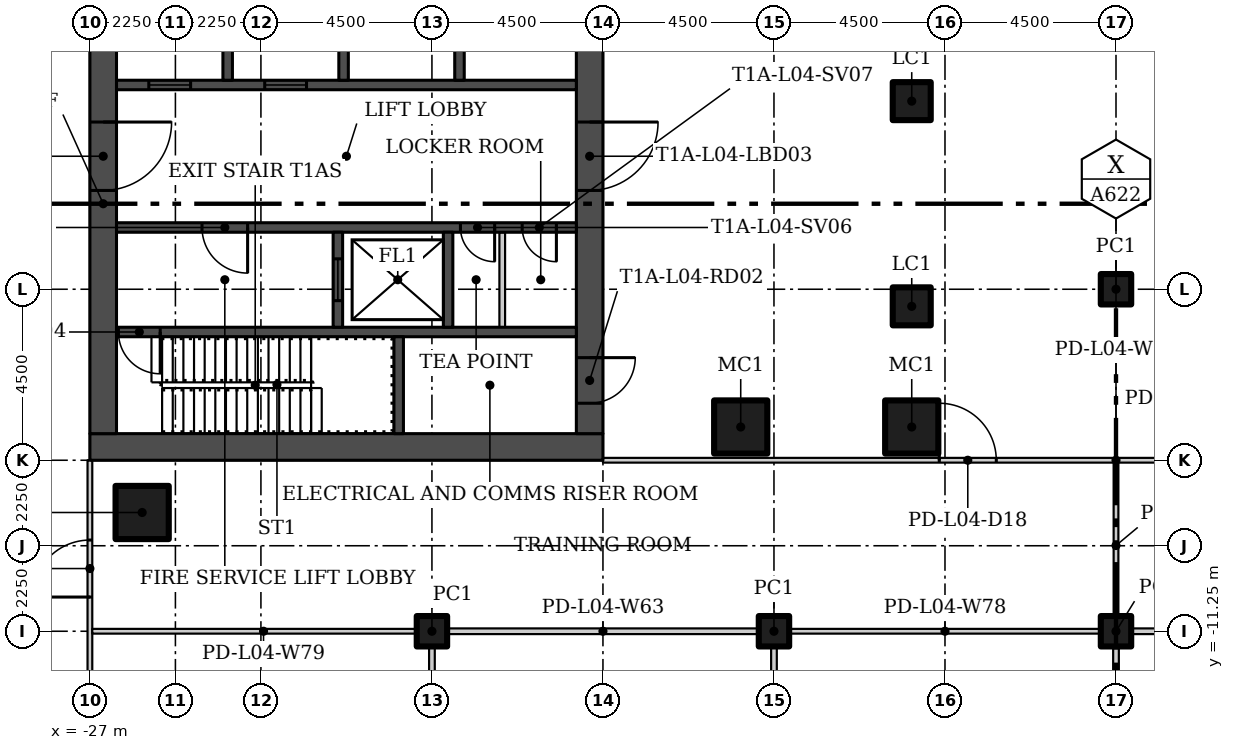
"""IFC4 building model, lengths in metres.
Left out: names, types, materials, properties, quantities, classifications, styles, units other than length and angle.
Written with IfcOpenShell. Run it as: python <this file> out.ifc"""

import sys

from ifc_helpers import new_model, si_unit, direction, frame, frame_2d, origin, origin_2d, place, context, subcontext, project, spatial, rectangle, hollow_rectangle, extrude, element, fill, save


model = new_model("IFC4")
c1 = context("Model", 3, precision=1e-05, world=origin(), true_north=direction((0.0, 1.0)))
c2 = subcontext(c1, "Body", "Model", "MODEL_VIEW")
j1 = project(units=[si_unit("LENGTHUNIT", "METRE"), si_unit("PLANEANGLEUNIT", "RADIAN")], contexts=[c1])
p1 = place(None, origin())
s1 = spatial("IfcSite", under=j1, at=p1, CompositionType="ELEMENT")
p2 = place(p1, origin())
s2 = spatial("IfcBuilding", under=s1, at=p2, CompositionType="ELEMENT")
p3 = place(p2, frame((0.0, 0.0, 23.5)))
s3 = spatial("IfcBuildingStorey", under=s2, at=p3, CompositionType="ELEMENT", Elevation=23.5)
for number, where in (
    (1, (-25.625, -8.125, 0.0)),
    (2, (-9.875, -5.875, 0.0)),
    (3, (-5.375, -5.875, 0.0)),
):
    element("IfcColumn", number, at=place(p3, frame(where)), inside=s3, PredefinedType="COLUMN", context=c2, shape_type="SweptSolid", body=[
        extrude(hollow_rectangle(XDim=1.4, YDim=1.4, WallThickness=0.06, at=origin_2d()), origin(), (0.0, 0.0, 1.0), 4.65),
    ])
for number, where in (
    (4, (-18.0, -11.25, 0.0)),
    (5, (-9.0, -11.25, 0.0)),
    (6, (0.0, -11.25, 0.0)),
    (7, (0.0, -2.25, 0.0)),
):
    element("IfcColumn", number, at=place(p3, frame(where)), inside=s3, PredefinedType="COLUMN", context=c2, shape_type="SweptSolid", body=[
        extrude(hollow_rectangle(XDim=0.8, YDim=0.8, WallThickness=0.03, at=origin_2d()), origin(), (0.0, 0.0, 1.0), 4.65),
    ])
for number, where in (
    (8, (-5.375, -2.7, 0.0)),
    (9, (-5.375, 2.7, 0.0)),
):
    element("IfcColumn", number, at=place(p3, frame(where)), inside=s3, PredefinedType="COLUMN", context=c2, shape_type="SweptSolid", body=[
        extrude(hollow_rectangle(XDim=1.0, YDim=1.0, WallThickness=0.04, at=origin_2d()), origin(), (0.0, 0.0, 1.0), 4.65),
    ])
p4 = place(p3, frame((-27.0, -29.188, 0.0), z_axis=(0.0, 0.0, 1.0), x_axis=(0.0, 1.0, 0.0)))
e10 = element("IfcWall", 10, at=p4, inside=s3, PredefinedType="PARTITIONING", context=c2, shape_type="SweptSolid", body=[
    extrude(rectangle(XDim=22.438, YDim=0.125, at=frame_2d((11.219, 0.0))), origin(), (0.0, 0.0, 1.0), 4.65),
])
p5 = place(p4, frame((3.087, 0.0, 0.0)))
e11 = element("IfcOpeningElement", 11, at=p5, cuts=e10, PredefinedType="OPENING", context=c2, shape_type="SweptSolid", body=[
    extrude(rectangle(XDim=1.5, YDim=2.1, at=frame_2d((0.75, 1.05))), frame((0.0, 0.073, 0.0), z_axis=(0.0, -1.0, 0.0), x_axis=(1.0, 0.0, 0.0)), (0.0, 0.0, 1.0), 0.145),
])
p6 = place(p4, frame((18.837, 0.0, 0.0)))
e12 = element("IfcOpeningElement", 12, at=p6, cuts=e10, PredefinedType="OPENING", context=c2, shape_type="SweptSolid", body=[
    extrude(rectangle(XDim=1.5, YDim=2.1, at=frame_2d((0.75, 1.05))), frame((0.0, 0.073, 0.0), z_axis=(0.0, -1.0, 0.0), x_axis=(1.0, 0.0, 0.0)), (0.0, 0.0, 1.0), 0.145),
])
p7 = place(p3, frame((-13.5, -6.75, 0.0)))
e13 = element("IfcWall", 13, at=p7, inside=s3, PredefinedType="PARTITIONING", context=c2, shape_type="SweptSolid", body=[
    extrude(rectangle(XDim=27.0, YDim=0.125, at=frame_2d((13.5, 0.0))), origin(), (0.0, 0.0, 1.0), 4.65),
])
p8 = place(p7, frame((8.85, 0.0, 0.0)))
e14 = element("IfcOpeningElement", 14, at=p8, cuts=e13, PredefinedType="OPENING", context=c2, shape_type="SweptSolid", body=[
    extrude(rectangle(XDim=1.5, YDim=2.1, at=frame_2d((0.75, 1.05))), frame((0.0, 0.073, 0.0), z_axis=(0.0, -1.0, 0.0), x_axis=(1.0, 0.0, 0.0)), (0.0, 0.0, 1.0), 0.145),
])
p9 = place(p7, frame((14.55, 0.0, 0.0)))
e15 = element("IfcOpeningElement", 15, at=p9, cuts=e13, PredefinedType="OPENING", context=c2, shape_type="SweptSolid", body=[
    extrude(rectangle(XDim=1.5, YDim=2.1, at=frame_2d((0.75, 1.05))), frame((0.0, 0.073, 0.0), z_axis=(0.0, -1.0, 0.0), x_axis=(1.0, 0.0, 0.0)), (0.0, 0.0, 1.0), 0.145),
])
p10 = place(p7, frame((25.2, 0.0, 0.0)))
e16 = element("IfcOpeningElement", 16, at=p10, cuts=e13, PredefinedType="OPENING", context=c2, shape_type="SweptSolid", body=[
    extrude(rectangle(XDim=1.5, YDim=2.1, at=frame_2d((0.75, 1.05))), frame((0.0, 0.073, 0.0), z_axis=(0.0, -1.0, 0.0), x_axis=(1.0, 0.0, 0.0)), (0.0, 0.0, 1.0), 0.145),
])
p11 = place(p3, frame((0.0, -11.325, 0.0), z_axis=(0.0, 0.0, 1.0), x_axis=(0.0, -1.0, 0.0)))
e17 = element("IfcWall", 17, at=p11, inside=s3, PredefinedType="PARTITIONING", context=c2, shape_type="SweptSolid", body=[
    extrude(rectangle(XDim=17.85, YDim=0.15, at=frame_2d((8.925, 0.0))), origin(), (0.0, 0.0, 1.0), 4.65),
])
p12 = place(p3, frame((27.075, -11.25, 0.0), z_axis=(0.0, 0.0, 1.0), x_axis=(-1.0, 0.0, 0.0)))
e18 = element("IfcWall", 18, at=p12, inside=s3, PredefinedType="PARTITIONING", context=c2, shape_type="SweptSolid", body=[
    extrude(rectangle(XDim=27.15, YDim=0.15, at=frame_2d((13.575, 0.0))), origin(), (0.0, 0.0, 1.0), 4.65),
])
p13 = place(p3, frame((-8.925, -11.25, 0.0), z_axis=(0.0, 0.0, 1.0), x_axis=(-1.0, 0.0, 0.0)))
e19 = element("IfcWall", 19, at=p13, inside=s3, PredefinedType="PARTITIONING", context=c2, shape_type="SweptSolid", body=[
    extrude(rectangle(XDim=9.15, YDim=0.15, at=frame_2d((4.575, 0.0))), origin(), (0.0, 0.0, 1.0), 4.65),
])
p14 = place(p3, frame((-18.0, -29.175, 0.0), z_axis=(0.0, 0.0, 1.0), x_axis=(0.0, 1.0, 0.0)))
e20 = element("IfcWall", 20, at=p14, inside=s3, PredefinedType="PARTITIONING", context=c2, shape_type="SweptSolid", body=[
    extrude(rectangle(XDim=17.85, YDim=0.15, at=frame_2d((8.925, 0.0))), origin(), (0.0, 0.0, 1.0), 4.65),
])
p15 = place(p3, frame((0.075, -11.25, 0.0), z_axis=(0.0, 0.0, 1.0), x_axis=(-1.0, 0.0, 0.0)))
e21 = element("IfcWall", 21, at=p15, inside=s3, PredefinedType="PARTITIONING", context=c2, shape_type="SweptSolid", body=[
    extrude(rectangle(XDim=9.15, YDim=0.125, at=frame_2d((4.575, 0.0))), origin(), (0.0, 0.0, 1.0), 4.65),
])
p16 = place(p3, frame((-17.925, -11.25, 0.0), z_axis=(0.0, 0.0, 1.0), x_axis=(-1.0, 0.0, 0.0)))
e22 = element("IfcWall", 22, at=p16, inside=s3, PredefinedType="PARTITIONING", context=c2, shape_type="SweptSolid", body=[
    extrude(rectangle(XDim=9.012, YDim=0.125, at=frame_2d((4.506, 0.0))), origin(), (0.0, 0.0, 1.0), 4.65),
])
p17 = place(p3, frame((-9.0, -29.175, 0.0), z_axis=(0.0, 0.0, 1.0), x_axis=(0.0, 1.0, 0.0)))
e23 = element("IfcWall", 23, at=p17, inside=s3, PredefinedType="PARTITIONING", context=c2, shape_type="SweptSolid", body=[
    extrude(rectangle(XDim=17.85, YDim=0.15, at=frame_2d((8.925, 0.0))), origin(), (0.0, 0.0, 1.0), 4.65),
])
p18 = place(p3, frame((0.0, -11.175, 0.0), z_axis=(0.0, 0.0, 1.0), x_axis=(0.0, 1.0, 0.0)))
e24 = element("IfcWall", 24, at=p18, inside=s3, PredefinedType="PARTITIONING", context=c2, shape_type="SweptSolid", body=[
    extrude(rectangle(XDim=4.363, YDim=0.125, at=frame_2d((2.181, 0.0))), origin(), (0.0, 0.0, 1.0), 4.65),
])
p19 = place(p3, frame((-27.0, -6.4, 0.0)))
e25 = element("IfcWall", 25, at=p19, inside=s3, PredefinedType="SHEAR", context=c2, shape_type="SweptSolid", body=[
    extrude(rectangle(XDim=13.5, YDim=0.7, at=frame_2d((6.75, 0.0))), origin(), (0.0, 0.0, 1.0), 4.65),
])
p20 = place(p3, frame((-26.65, 6.05, 0.0), z_axis=(0.0, 0.0, 1.0), x_axis=(0.0, -1.0, 0.0)))
e26 = element("IfcWall", 26, at=p20, inside=s3, PredefinedType="SHEAR", context=c2, shape_type="SweptSolid", body=[
    extrude(rectangle(XDim=12.1, YDim=0.7, at=frame_2d((6.05, 0.0))), origin(), (0.0, 0.0, 1.0), 4.65),
])
p21 = place(p20, frame((3.9, 0.0, 0.0)))
e27 = element("IfcOpeningElement", 27, at=p21, cuts=e26, PredefinedType="OPENING", context=c2, shape_type="SweptSolid", body=[
    extrude(rectangle(XDim=1.8, YDim=2.4, at=frame_2d((0.9, 1.2))), frame((0.0, 0.36, 0.0), z_axis=(0.0, -1.0, 0.0), x_axis=(1.0, 0.0, 0.0)), (0.0, 0.0, 1.0), 0.72),
])
p22 = place(p3, frame((-13.85, 6.05, 0.0), z_axis=(0.0, 0.0, 1.0), x_axis=(0.0, -1.0, 0.0)))
e28 = element("IfcWall", 28, at=p22, inside=s3, PredefinedType="SHEAR", context=c2, shape_type="SweptSolid", body=[
    extrude(rectangle(XDim=12.1, YDim=0.7, at=frame_2d((6.05, 0.0))), origin(), (0.0, 0.0, 1.0), 4.65),
])
p23 = place(p22, frame((10.1, 0.0, 0.0)))
e29 = element("IfcOpeningElement", 29, at=p23, cuts=e28, PredefinedType="OPENING", context=c2, shape_type="SweptSolid", body=[
    extrude(rectangle(XDim=1.2, YDim=2.1, at=frame_2d((0.6, 1.05))), frame((0.0, 0.36, 0.0), z_axis=(0.0, -1.0, 0.0), x_axis=(1.0, 0.0, 0.0)), (0.0, 0.0, 1.0), 0.72),
])
p24 = place(p22, frame((3.9, 0.0, 0.0)))
e30 = element("IfcOpeningElement", 30, at=p24, cuts=e28, PredefinedType="OPENING", context=c2, shape_type="SweptSolid", body=[
    extrude(rectangle(XDim=1.8, YDim=2.4, at=frame_2d((0.9, 1.2))), frame((0.0, 0.36, 0.0), z_axis=(0.0, -1.0, 0.0), x_axis=(1.0, 0.0, 0.0)), (0.0, 0.0, 1.0), 0.72),
])
p25 = place(p3, frame((-14.2, -3.375, 0.0), z_axis=(0.0, 0.0, 1.0), x_axis=(-1.0, 0.0, 0.0)))
e31 = element("IfcWall", 31, at=p25, inside=s3, PredefinedType="SHEAR", context=c2, shape_type="SweptSolid", body=[
    extrude(rectangle(XDim=12.1, YDim=0.25, at=frame_2d((6.05, 0.0))), origin(), (0.0, 0.0, 1.0), 4.65),
])
p26 = place(p25, frame((10.95, 0.0, 0.0)))
e32 = element("IfcOpeningElement", 32, at=p26, cuts=e31, PredefinedType="OPENING", context=c2, shape_type="SweptSolid", body=[
    extrude(rectangle(XDim=1.1, YDim=2.1, at=frame_2d((0.55, 1.05))), frame((0.0, 0.135, 0.0), z_axis=(0.0, -1.0, 0.0), x_axis=(1.0, 0.0, 0.0)), (0.0, 0.0, 1.0), 0.27),
])
p27 = place(p3, frame((-18.875, -6.05, 0.0), z_axis=(0.0, 0.0, 1.0), x_axis=(0.0, 1.0, 0.0)))
e33 = element("IfcWall", 33, at=p27, inside=s3, PredefinedType="SHEAR", context=c2, shape_type="SweptSolid", body=[
    extrude(rectangle(XDim=2.55, YDim=0.25, at=frame_2d((1.275, 0.0))), origin(), (0.0, 0.0, 1.0), 4.65),
])
p28 = place(p3, frame((-14.2, -0.625, 0.0), z_axis=(0.0, 0.0, 1.0), x_axis=(-1.0, 0.0, 0.0)))
e34 = element("IfcWall", 34, at=p28, inside=s3, PredefinedType="SHEAR", context=c2, shape_type="SweptSolid", body=[
    extrude(rectangle(XDim=12.1, YDim=0.25, at=frame_2d((6.05, 0.0))), origin(), (0.0, 0.0, 1.0), 4.65),
])
p29 = place(p28, frame((8.65, 0.0, 0.0)))
e35 = element("IfcOpeningElement", 35, at=p29, cuts=e34, PredefinedType="OPENING", context=c2, shape_type="SweptSolid", body=[
    extrude(rectangle(XDim=1.2, YDim=2.1, at=frame_2d((0.6, 1.05))), frame((0.0, 0.135, 0.0), z_axis=(0.0, -1.0, 0.0), x_axis=(1.0, 0.0, 0.0)), (0.0, 0.0, 1.0), 0.27),
])
p30 = place(p28, frame((2.15, 0.0, 0.0)))
e36 = element("IfcOpeningElement", 36, at=p30, cuts=e34, PredefinedType="OPENING", context=c2, shape_type="SweptSolid", body=[
    extrude(rectangle(XDim=0.9, YDim=2.1, at=frame_2d((0.45, 1.05))), frame((0.0, 0.135, 0.0), z_axis=(0.0, -1.0, 0.0), x_axis=(1.0, 0.0, 0.0)), (0.0, 0.0, 1.0), 0.27),
])
p31 = place(p28, frame((0.525, 0.0, 0.0)))
e37 = element("IfcOpeningElement", 37, at=p31, cuts=e34, PredefinedType="OPENING", context=c2, shape_type="SweptSolid", body=[
    extrude(rectangle(XDim=0.9, YDim=2.1, at=frame_2d((0.45, 1.05))), frame((0.0, 0.135, 0.0), z_axis=(0.0, -1.0, 0.0), x_axis=(1.0, 0.0, 0.0)), (0.0, 0.0, 1.0), 0.27),
])
p32 = place(p3, frame((-20.475, -3.25, 0.0), z_axis=(0.0, 0.0, 1.0), x_axis=(0.0, 1.0, 0.0)))
e38 = element("IfcWall", 38, at=p32, inside=s3, PredefinedType="SHEAR", context=c2, shape_type="SweptSolid", body=[
    extrude(rectangle(XDim=2.5, YDim=0.25, at=frame_2d((1.25, 0.0))), origin(), (0.0, 0.0, 1.0), 4.65),
])
p33 = place(p32, frame((0.7, 0.0, 0.0)))
e39 = element("IfcOpeningElement", 39, at=p33, cuts=e38, PredefinedType="OPENING", context=c2, shape_type="SweptSolid", body=[
    extrude(rectangle(XDim=1.1, YDim=2.1, at=frame_2d((0.55, 1.05))), frame((0.0, 0.135, 0.0), z_axis=(0.0, -1.0, 0.0), x_axis=(1.0, 0.0, 0.0)), (0.0, 0.0, 1.0), 0.27),
])
p34 = place(p3, frame((-17.575, -3.25, 0.0), z_axis=(0.0, 0.0, 1.0), x_axis=(0.0, 1.0, 0.0)))
e40 = element("IfcWall", 40, at=p34, inside=s3, PredefinedType="SHEAR", context=c2, shape_type="SweptSolid", body=[
    extrude(rectangle(XDim=2.5, YDim=0.25, at=frame_2d((1.25, 0.0))), origin(), (0.0, 0.0, 1.0), 4.65),
])
p35 = place(p3, frame((-16.15, -3.25, 0.0), z_axis=(0.0, 0.0, 1.0), x_axis=(0.0, 1.0, 0.0)))
e41 = element("IfcWall", 41, at=p35, inside=s3, PredefinedType="PARTITIONING", context=c2, shape_type="SweptSolid", body=[
    extrude(rectangle(XDim=2.5, YDim=0.15, at=frame_2d((1.25, 0.0))), origin(), (0.0, 0.0, 1.0), 4.65),
])
p36 = place(p3, frame((-26.3, 3.125, 0.0)))
e42 = element("IfcWall", 42, at=p36, inside=s3, PredefinedType="SHEAR", context=c2, shape_type="SweptSolid", body=[
    extrude(rectangle(XDim=12.1, YDim=0.25, at=frame_2d((6.05, 0.0))), origin(), (0.0, 0.0, 1.0), 4.65),
])
p37 = place(p36, frame((0.85, 0.0, 0.0)))
e43 = element("IfcOpeningElement", 43, at=p37, cuts=e42, PredefinedType="OPENING", context=c2, shape_type="SweptSolid", body=[
    extrude(rectangle(XDim=1.1, YDim=2.1, at=frame_2d((0.55, 1.05))), frame((0.0, 0.135, 0.0), z_axis=(0.0, -1.0, 0.0), x_axis=(1.0, 0.0, 0.0)), (0.0, 0.0, 1.0), 0.27),
])
p38 = place(p36, frame((3.9, 0.0, 0.0)))
e44 = element("IfcOpeningElement", 44, at=p38, cuts=e42, PredefinedType="OPENING", context=c2, shape_type="SweptSolid", body=[
    extrude(rectangle(XDim=1.1, YDim=2.1, at=frame_2d((0.55, 1.05))), frame((0.0, 0.135, 0.0), z_axis=(0.0, -1.0, 0.0), x_axis=(1.0, 0.0, 0.0)), (0.0, 0.0, 1.0), 0.27),
])
for number, where, z_axis, x_axis in (
    (45, (-23.375, 3.25, 0.0), (0.0, 0.0, 1.0), (0.0, 1.0, 0.0)),
    (46, (-20.325, 3.25, 0.0), (0.0, 0.0, 1.0), (0.0, 1.0, 0.0)),
    (47, (-17.275, 3.25, 0.0), (0.0, 0.0, 1.0), (0.0, 1.0, 0.0)),
):
    element("IfcWall", number, at=place(p3, frame(where, z_axis=z_axis, x_axis=x_axis)), inside=s3, PredefinedType="SHEAR", context=c2, shape_type="SweptSolid", body=[
        extrude(rectangle(XDim=2.8, YDim=0.25, at=frame_2d((1.4, 0.0))), origin(), (0.0, 0.0, 1.0), 4.65),
    ])
p39 = place(p6, origin())
e48 = element("IfcDoor", 48, at=p39, inside=s3, OperationType="DOUBLE_DOOR_SINGLE_SWING", PredefinedType="DOOR", context=c2, shape_type="SweptSolid", body=[
    extrude(rectangle(XDim=1.5, YDim=2.1, at=frame_2d((0.75, 1.05))), frame((0.0, 0.025, 0.0), z_axis=(0.0, -1.0, 0.0), x_axis=(1.0, 0.0, 0.0)), (0.0, 0.0, 1.0), 0.05),
])
fill(e12, e48)
p40 = place(p8, origin())
e49 = element("IfcDoor", 49, at=p40, inside=s3, OperationType="DOUBLE_DOOR_SINGLE_SWING", PredefinedType="DOOR", context=c2, shape_type="SweptSolid", body=[
    extrude(rectangle(XDim=1.5, YDim=2.1, at=frame_2d((0.75, 1.05))), frame((0.0, 0.025, 0.0), z_axis=(0.0, -1.0, 0.0), x_axis=(1.0, 0.0, 0.0)), (0.0, 0.0, 1.0), 0.05),
])
fill(e14, e49)
p41 = place(p21, origin())
e50 = element("IfcDoor", 50, at=p41, inside=s3, OperationType="DOUBLE_DOOR_SINGLE_SWING", PredefinedType="DOOR", context=c2, shape_type="SweptSolid", body=[
    extrude(rectangle(XDim=1.8, YDim=2.4, at=frame_2d((0.9, 1.2))), frame((0.0, 0.025, 0.0), z_axis=(0.0, -1.0, 0.0), x_axis=(1.0, 0.0, 0.0)), (0.0, 0.0, 1.0), 0.05),
])
fill(e27, e50)
p42 = place(p23, origin())
e51 = element("IfcDoor", 51, at=p42, inside=s3, OperationType="SINGLE_SWING_RIGHT", PredefinedType="DOOR", context=c2, shape_type="SweptSolid", body=[
    extrude(rectangle(XDim=1.2, YDim=2.1, at=frame_2d((0.6, 1.05))), frame((0.0, 0.025, 0.0), z_axis=(0.0, -1.0, 0.0), x_axis=(1.0, 0.0, 0.0)), (0.0, 0.0, 1.0), 0.05),
])
fill(e29, e51)
p43 = place(p24, origin())
e52 = element("IfcDoor", 52, at=p43, inside=s3, OperationType="DOUBLE_DOOR_SINGLE_SWING", PredefinedType="DOOR", context=c2, shape_type="SweptSolid", body=[
    extrude(rectangle(XDim=1.8, YDim=2.4, at=frame_2d((0.9, 1.2))), frame((0.0, 0.025, 0.0), z_axis=(0.0, -1.0, 0.0), x_axis=(1.0, 0.0, 0.0)), (0.0, 0.0, 1.0), 0.05),
])
fill(e30, e52)
p44 = place(p26, origin())
e53 = element("IfcDoor", 53, at=p44, inside=s3, OperationType="SINGLE_SWING_RIGHT", PredefinedType="DOOR", context=c2, shape_type="SweptSolid", body=[
    extrude(rectangle(XDim=1.1, YDim=2.1, at=frame_2d((0.55, 1.05))), frame((0.0, 0.025, 0.0), z_axis=(0.0, -1.0, 0.0), x_axis=(1.0, 0.0, 0.0)), (0.0, 0.0, 1.0), 0.05),
])
fill(e32, e53)
p45 = place(p29, origin())
e54 = element("IfcDoor", 54, at=p45, inside=s3, OperationType="SINGLE_SWING_RIGHT", PredefinedType="DOOR", context=c2, shape_type="SweptSolid", body=[
    extrude(rectangle(XDim=1.2, YDim=2.1, at=frame_2d((0.6, 1.05))), frame((0.0, 0.025, 0.0), z_axis=(0.0, -1.0, 0.0), x_axis=(1.0, 0.0, 0.0)), (0.0, 0.0, 1.0), 0.05),
])
fill(e35, e54)
p46 = place(p30, origin())
e55 = element("IfcDoor", 55, at=p46, inside=s3, OperationType="SINGLE_SWING_LEFT", PredefinedType="DOOR", context=c2, shape_type="SweptSolid", body=[
    extrude(rectangle(XDim=0.9, YDim=2.1, at=frame_2d((0.45, 1.05))), frame((0.0, 0.025, 0.0), z_axis=(0.0, -1.0, 0.0), x_axis=(1.0, 0.0, 0.0)), (0.0, 0.0, 1.0), 0.05),
])
fill(e36, e55)
p47 = place(p31, origin())
e56 = element("IfcDoor", 56, at=p47, inside=s3, OperationType="SINGLE_SWING_LEFT", PredefinedType="DOOR", context=c2, shape_type="SweptSolid", body=[
    extrude(rectangle(XDim=0.9, YDim=2.1, at=frame_2d((0.45, 1.05))), frame((0.0, 0.025, 0.0), z_axis=(0.0, -1.0, 0.0), x_axis=(1.0, 0.0, 0.0)), (0.0, 0.0, 1.0), 0.05),
])
fill(e37, e56)
p48 = place(p33, origin())
e57 = element("IfcDoor", 57, at=p48, inside=s3, OperationType="SLIDING_TO_LEFT", PredefinedType="DOOR", context=c2, shape_type="SweptSolid", body=[
    extrude(rectangle(XDim=1.1, YDim=2.1, at=frame_2d((0.55, 1.05))), frame((0.0, 0.025, 0.0), z_axis=(0.0, -1.0, 0.0), x_axis=(1.0, 0.0, 0.0)), (0.0, 0.0, 1.0), 0.05),
])
fill(e39, e57)
p49 = place(p37, origin())
e58 = element("IfcDoor", 58, at=p49, inside=s3, OperationType="SLIDING_TO_LEFT", PredefinedType="DOOR", context=c2, shape_type="SweptSolid", body=[
    extrude(rectangle(XDim=1.1, YDim=2.1, at=frame_2d((0.55, 1.05))), frame((0.0, 0.025, 0.0), z_axis=(0.0, -1.0, 0.0), x_axis=(1.0, 0.0, 0.0)), (0.0, 0.0, 1.0), 0.05),
])
fill(e43, e58)
p50 = place(p38, origin())
e59 = element("IfcDoor", 59, at=p50, inside=s3, OperationType="SLIDING_TO_LEFT", PredefinedType="DOOR", context=c2, shape_type="SweptSolid", body=[
    extrude(rectangle(XDim=1.1, YDim=2.1, at=frame_2d((0.55, 1.05))), frame((0.0, 0.025, 0.0), z_axis=(0.0, -1.0, 0.0), x_axis=(1.0, 0.0, 0.0)), (0.0, 0.0, 1.0), 0.05),
])
fill(e44, e59)
save(model, sys.argv[1])
